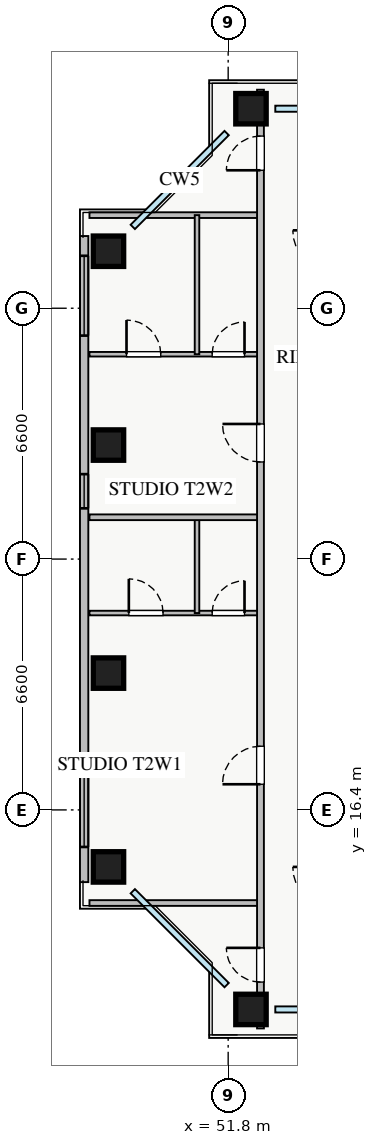
"""IFC4 building model, lengths in metres.
Left out: names, types, materials, properties, quantities, classifications, styles, units other than length and angle.
Written with IfcOpenShell. Run it as: python <this file> out.ifc"""

import sys

from ifc_helpers import new_model, si_unit, direction, frame, frame_2d, origin, origin_2d, place, context, subcontext, project, spatial, rectangle, extrude, source, transform, mapped, element, fill, save


model = new_model("IFC4")
c1 = context("Model", 3, precision=1e-05, world=origin(), true_north=direction((0.0, 1.0)))
c2 = subcontext(c1, "Body", "Model", "MODEL_VIEW")
j1 = project(units=[si_unit("LENGTHUNIT", "METRE"), si_unit("PLANEANGLEUNIT", "RADIAN")], contexts=[c1])
p1 = place(None, origin())
s1 = spatial("IfcSite", under=j1, at=p1, CompositionType="ELEMENT")
p2 = place(p1, origin())
s2 = spatial("IfcBuilding", under=s1, at=p2, CompositionType="ELEMENT")
p3 = place(p2, frame((0.0, 0.0, 100.25)))
s3 = spatial("IfcBuildingStorey", under=s2, at=p3, CompositionType="ELEMENT", Elevation=100.25)
m1 = source(origin(), c2, "Body", "SweptSolid", [
    extrude(rectangle(XDim=0.8, YDim=0.8, at=origin_2d()), origin(), (0.0, 0.0, 1.0), 3.25),
])
for number, where, z_axis, x_axis in (
    (1, (52.4, 11.15, 0.0), (0.0, 0.0, 1.0), (1.0, 0.0, 0.0)),
    (2, (52.4, 34.85, 0.0), (0.0, 0.0, 1.0), (1.0, 0.0, 0.0)),
    (3, (48.65, 14.9, 0.0), (0.0, 0.0, 1.0), (1.0, 0.0, 0.0)),
    (4, (48.65, 20.0, 0.0), (0.0, 0.0, 1.0), (1.0, 0.0, 0.0)),
    (5, (48.65, 26.0, 0.0), (0.0, 0.0, 1.0), (1.0, 0.0, 0.0)),
    (6, (48.65, 31.1, 0.0), (0.0, 0.0, 1.0), (1.0, 0.0, 0.0)),
):
    element("IfcColumn", number, at=place(p3, frame(where, z_axis=z_axis, x_axis=x_axis)), inside=s3, PredefinedType="COLUMN", context=c2, shape_type="MappedRepresentation", body=[
        mapped(m1, transform((0.0, 0.0, 0.0), x_axis=(1.0, 0.0, 0.0), y_axis=(0.0, 1.0, 0.0), z_axis=(0.0, 0.0, 1.0), scale=1.0)),
    ])
p4 = place(p3, frame((48.01, 14.5, 0.0), z_axis=(0.0, 0.0, 1.0), x_axis=(0.0, 1.0, 0.0)))
e7 = element("IfcWall", 7, at=p4, inside=s3, PredefinedType="STANDARD", context=c2, shape_type="SweptSolid", body=[
    extrude(rectangle(XDim=17.0, YDim=0.22, at=frame_2d((8.5, 0.0))), origin(), (0.0, 0.0, 1.0), 2.61),
])
p5 = place(p4, frame((0.925, 0.0, 0.9)))
e8 = element("IfcOpeningElement", 8, at=p5, cuts=e7, PredefinedType="OPENING", context=c2, shape_type="SweptSolid", body=[
    extrude(rectangle(XDim=2.4, YDim=1.48, at=frame_2d((1.2, 0.74))), frame((0.0, 0.12, 0.0), z_axis=(0.0, -1.0, 0.0), x_axis=(1.0, 0.0, 0.0)), (0.0, 0.0, 1.0), 0.24),
])
p6 = place(p4, frame((14.38, 0.0, 0.9)))
e9 = element("IfcOpeningElement", 9, at=p6, cuts=e7, PredefinedType="OPENING", context=c2, shape_type="SweptSolid", body=[
    extrude(rectangle(XDim=2.1, YDim=1.5, at=frame_2d((1.05, 0.75))), frame((0.0, 0.12, 0.0), z_axis=(0.0, -1.0, 0.0), x_axis=(1.0, 0.0, 0.0)), (0.0, 0.0, 1.0), 0.24),
])
p7 = place(p4, frame((9.835, 0.0, 0.9)))
e10 = element("IfcOpeningElement", 10, at=p7, cuts=e7, PredefinedType="OPENING", context=c2, shape_type="SweptSolid", body=[
    extrude(rectangle(XDim=0.9, YDim=1.2, at=frame_2d((0.45, 0.6))), frame((0.0, 0.12, 0.0), z_axis=(0.0, -1.0, 0.0), x_axis=(1.0, 0.0, 0.0)), (0.0, 0.0, 1.0), 0.24),
])
for number, where, z_axis, x_axis in (
    (11, (48.15, 32.05, 0.0), (0.0, 0.0, 1.0), (1.0, 0.0, 0.0)),
    (12, (48.15, 13.95, 0.0), (0.0, 0.0, 1.0), (1.0, 0.0, 0.0)),
):
    element("IfcWall", number, at=place(p3, frame(where, z_axis=z_axis, x_axis=x_axis)), inside=s3, PredefinedType="PARTITIONING", context=c2, shape_type="SweptSolid", body=[
        extrude(rectangle(XDim=4.5, YDim=0.15, at=frame_2d((2.25, 0.0))), origin(), (0.0, 0.0, 1.0), 3.07),
    ])
p8 = place(p3, frame((48.15, 21.58, 0.0), z_axis=(0.0, 0.0, 1.0), x_axis=(1.0, 0.0, 0.0)))
e13 = element("IfcWall", 13, at=p8, inside=s3, PredefinedType="PLUMBINGWALL", context=c2, shape_type="SweptSolid", body=[
    extrude(rectangle(XDim=4.5, YDim=0.12, at=frame_2d((2.25, 0.0))), origin(), (0.0, 0.0, 1.0), 3.07),
])
p9 = place(p8, frame((1.036, 0.0, 0.0)))
e14 = element("IfcOpeningElement", 14, at=p9, cuts=e13, PredefinedType="OPENING", context=c2, shape_type="SweptSolid", body=[
    extrude(rectangle(XDim=0.9, YDim=2.05, at=frame_2d((0.45, 1.025))), frame((0.0, 0.07, 0.0), z_axis=(0.0, -1.0, 0.0), x_axis=(1.0, 0.0, 0.0)), (0.0, 0.0, 1.0), 0.14),
])
p10 = place(p8, frame((3.23, 0.0, 0.0)))
e15 = element("IfcOpeningElement", 15, at=p10, cuts=e13, PredefinedType="OPENING", context=c2, shape_type="SweptSolid", body=[
    extrude(rectangle(XDim=0.85, YDim=2.05, at=frame_2d((0.425, 1.025))), frame((0.0, 0.07, 0.0), z_axis=(0.0, -1.0, 0.0), x_axis=(1.0, 0.0, 0.0)), (0.0, 0.0, 1.0), 0.14),
])
p11 = place(p3, frame((50.98, 21.58, 0.0), z_axis=(0.0, 0.0, 1.0), x_axis=(0.0, 1.0, 0.0)))
e16 = element("IfcWall", 16, at=p11, inside=s3, PredefinedType="PLUMBINGWALL", context=c2, shape_type="SweptSolid", body=[
    extrude(rectangle(XDim=2.52, YDim=0.12, at=frame_2d((1.26, 0.0))), origin(), (0.0, 0.0, 1.0), 3.07),
])
p12 = place(p3, frame((48.15, 28.39, 0.0), z_axis=(0.0, 0.0, 1.0), x_axis=(1.0, 0.0, 0.0)))
e17 = element("IfcWall", 17, at=p12, inside=s3, PredefinedType="PLUMBINGWALL", context=c2, shape_type="SweptSolid", body=[
    extrude(rectangle(XDim=4.5, YDim=0.12, at=frame_2d((2.25, 0.0))), origin(), (0.0, 0.0, 1.0), 3.07),
])
p13 = place(p12, frame((0.975, 0.0, 0.0)))
e18 = element("IfcOpeningElement", 18, at=p13, cuts=e17, PredefinedType="OPENING", context=c2, shape_type="SweptSolid", body=[
    extrude(rectangle(XDim=0.9, YDim=2.05, at=frame_2d((0.45, 1.025))), frame((0.0, 0.07, 0.0), z_axis=(0.0, -1.0, 0.0), x_axis=(1.0, 0.0, 0.0)), (0.0, 0.0, 1.0), 0.14),
])
p14 = place(p12, frame((3.23, 0.0, 0.0)))
e19 = element("IfcOpeningElement", 19, at=p14, cuts=e17, PredefinedType="OPENING", context=c2, shape_type="SweptSolid", body=[
    extrude(rectangle(XDim=0.85, YDim=2.05, at=frame_2d((0.425, 1.025))), frame((0.0, 0.07, 0.0), z_axis=(0.0, -1.0, 0.0), x_axis=(1.0, 0.0, 0.0)), (0.0, 0.0, 1.0), 0.14),
])
p15 = place(p3, frame((50.98, 28.39, 0.0), z_axis=(0.0, 0.0, 1.0), x_axis=(0.0, 1.0, 0.0)))
e20 = element("IfcWall", 20, at=p15, inside=s3, PredefinedType="PLUMBINGWALL", context=c2, shape_type="SweptSolid", body=[
    extrude(rectangle(XDim=3.66, YDim=0.12, at=frame_2d((1.83, 0.0))), origin(), (0.0, 0.0, 1.0), 3.07),
])
p16 = place(p3, frame((48.15, 24.1, 0.0), z_axis=(0.0, 0.0, 1.0), x_axis=(1.0, 0.0, 0.0)))
e21 = element("IfcWall", 21, at=p16, inside=s3, PredefinedType="PARTITIONING", context=c2, shape_type="SweptSolid", body=[
    extrude(rectangle(XDim=4.5, YDim=0.15, at=frame_2d((2.25, 0.0))), origin(), (0.0, 0.0, 1.0), 3.07),
])
p17 = place(p3, frame((52.65, 10.65, 0.0), z_axis=(0.0, 0.0, 1.0), x_axis=(0.0, 1.0, 0.0)))
e22 = element("IfcWall", 22, at=p17, inside=s3, PredefinedType="PARTITIONING", context=c2, shape_type="SweptSolid", body=[
    extrude(rectangle(XDim=24.7, YDim=0.18, at=frame_2d((12.35, 0.0))), origin(), (0.0, 0.0, 1.0), 2.615),
])
p18 = place(p17, frame((22.58, 0.0, 0.0)))
e23 = element("IfcOpeningElement", 23, at=p18, cuts=e22, PredefinedType="OPENING", context=c2, shape_type="SweptSolid", body=[
    extrude(rectangle(XDim=0.9, YDim=2.05, at=frame_2d((0.45, 1.025))), frame((0.0, 0.1, 0.0), z_axis=(0.0, -1.0, 0.0), x_axis=(1.0, 0.0, 0.0)), (0.0, 0.0, 1.0), 0.2),
])
p19 = place(p17, frame((1.22, 0.0, 0.0)))
e24 = element("IfcOpeningElement", 24, at=p19, cuts=e22, PredefinedType="OPENING", context=c2, shape_type="SweptSolid", body=[
    extrude(rectangle(XDim=0.9, YDim=2.05, at=frame_2d((0.45, 1.025))), frame((0.0, 0.1, 0.0), z_axis=(0.0, -1.0, 0.0), x_axis=(1.0, 0.0, 0.0)), (0.0, 0.0, 1.0), 0.2),
])
p20 = place(p17, frame((6.425, 0.0, 0.0)))
e25 = element("IfcOpeningElement", 25, at=p20, cuts=e22, PredefinedType="OPENING", context=c2, shape_type="SweptSolid", body=[
    extrude(rectangle(XDim=1.0, YDim=2.05, at=frame_2d((0.5, 1.025))), frame((0.0, 0.1, 0.0), z_axis=(0.0, -1.0, 0.0), x_axis=(1.0, 0.0, 0.0)), (0.0, 0.0, 1.0), 0.2),
])
p21 = place(p17, frame((14.905, 0.0, 0.0)))
e26 = element("IfcOpeningElement", 26, at=p21, cuts=e22, PredefinedType="OPENING", context=c2, shape_type="SweptSolid", body=[
    extrude(rectangle(XDim=1.0, YDim=2.05, at=frame_2d((0.5, 1.025))), frame((0.0, 0.1, 0.0), z_axis=(0.0, -1.0, 0.0), x_axis=(1.0, 0.0, 0.0)), (0.0, 0.0, 1.0), 0.2),
])
m2 = source(origin(), c2, "Body", "SweptSolid", [
    extrude(rectangle(XDim=2.4, YDim=1.48, at=frame_2d((1.2, 0.74))), frame((0.0, 0.03, 0.0), z_axis=(0.0, -1.0, 0.0), x_axis=(1.0, 0.0, 0.0)), (0.0, 0.0, 1.0), 0.06),
])
p22 = place(p5, origin())
e27 = element("IfcWindow", 27, at=p22, inside=s3, PartitioningType="TRIPLE_PANEL_VERTICAL", PredefinedType="WINDOW", context=c2, shape_type="MappedRepresentation", body=[
    mapped(m2, transform((0.0, 0.0, 0.0), x_axis=(1.0, 0.0, 0.0), y_axis=(0.0, 1.0, 0.0), z_axis=(0.0, 0.0, 1.0), scale=1.0)),
])
fill(e8, e27)
m3 = source(origin(), c2, "Body", "SweptSolid", [
    extrude(rectangle(XDim=2.1, YDim=1.5, at=frame_2d((1.05, 0.75))), frame((0.0, 0.03, 0.0), z_axis=(0.0, -1.0, 0.0), x_axis=(1.0, 0.0, 0.0)), (0.0, 0.0, 1.0), 0.06),
])
p23 = place(p6, origin())
e28 = element("IfcWindow", 28, at=p23, inside=s3, PartitioningType="TRIPLE_PANEL_VERTICAL", PredefinedType="WINDOW", context=c2, shape_type="MappedRepresentation", body=[
    mapped(m3, transform((0.0, 0.0, 0.0), x_axis=(1.0, 0.0, 0.0), y_axis=(0.0, 1.0, 0.0), z_axis=(0.0, 0.0, 1.0), scale=1.0)),
])
fill(e9, e28)
m4 = source(origin(), c2, "Body", "SweptSolid", [
    extrude(rectangle(XDim=0.9, YDim=2.05, at=frame_2d((0.45, 1.025))), frame((0.0, 0.025, 0.0), z_axis=(0.0, -1.0, 0.0), x_axis=(1.0, 0.0, 0.0)), (0.0, 0.0, 1.0), 0.05),
])
p24 = place(p9, origin())
e29 = element("IfcDoor", 29, at=p24, inside=s3, OperationType="SINGLE_SWING_LEFT", PredefinedType="DOOR", context=c2, shape_type="MappedRepresentation", body=[
    mapped(m4, transform((0.0, 0.0, 0.0), x_axis=(1.0, 0.0, 0.0), y_axis=(0.0, 1.0, 0.0), z_axis=(0.0, 0.0, 1.0), scale=1.0)),
])
fill(e14, e29)
m5 = source(origin(), c2, "Body", "SweptSolid", [
    extrude(rectangle(XDim=0.85, YDim=2.05, at=frame_2d((0.425, 1.025))), frame((0.0, 0.025, 0.0), z_axis=(0.0, -1.0, 0.0), x_axis=(1.0, 0.0, 0.0)), (0.0, 0.0, 1.0), 0.05),
])
p25 = place(p10, origin())
e30 = element("IfcDoor", 30, at=p25, inside=s3, OperationType="SINGLE_SWING_RIGHT", PredefinedType="DOOR", context=c2, shape_type="MappedRepresentation", body=[
    mapped(m5, transform((0.0, 0.0, 0.0), x_axis=(1.0, 0.0, 0.0), y_axis=(0.0, 1.0, 0.0), z_axis=(0.0, 0.0, 1.0), scale=1.0)),
])
fill(e15, e30)
p26 = place(p13, origin())
e31 = element("IfcDoor", 31, at=p26, inside=s3, OperationType="SINGLE_SWING_LEFT", PredefinedType="DOOR", context=c2, shape_type="MappedRepresentation", body=[
    mapped(m4, transform((0.0, 0.0, 0.0), x_axis=(1.0, 0.0, 0.0), y_axis=(0.0, 1.0, 0.0), z_axis=(0.0, 0.0, 1.0), scale=1.0)),
])
fill(e18, e31)
p27 = place(p14, origin())
e32 = element("IfcDoor", 32, at=p27, inside=s3, OperationType="SINGLE_SWING_RIGHT", PredefinedType="DOOR", context=c2, shape_type="MappedRepresentation", body=[
    mapped(m5, transform((0.0, 0.0, 0.0), x_axis=(1.0, 0.0, 0.0), y_axis=(0.0, 1.0, 0.0), z_axis=(0.0, 0.0, 1.0), scale=1.0)),
])
fill(e19, e32)
p28 = place(p18, origin())
e33 = element("IfcDoor", 33, at=p28, inside=s3, OperationType="SINGLE_SWING_LEFT", PredefinedType="DOOR", context=c2, shape_type="MappedRepresentation", body=[
    mapped(m4, transform((0.0, 0.0, 0.0), x_axis=(1.0, 0.0, 0.0), y_axis=(0.0, 1.0, 0.0), z_axis=(0.0, 0.0, 1.0), scale=1.0)),
])
fill(e23, e33)
p29 = place(p19, origin())
e34 = element("IfcDoor", 34, at=p29, inside=s3, OperationType="SINGLE_SWING_RIGHT", PredefinedType="DOOR", context=c2, shape_type="MappedRepresentation", body=[
    mapped(m4, transform((0.0, 0.0, 0.0), x_axis=(1.0, 0.0, 0.0), y_axis=(0.0, 1.0, 0.0), z_axis=(0.0, 0.0, 1.0), scale=1.0)),
])
fill(e24, e34)
m6 = source(origin(), c2, "Body", "SweptSolid", [
    extrude(rectangle(XDim=1.0, YDim=2.05, at=frame_2d((0.5, 1.025))), frame((0.0, 0.025, 0.0), z_axis=(0.0, -1.0, 0.0), x_axis=(1.0, 0.0, 0.0)), (0.0, 0.0, 1.0), 0.05),
])
p30 = place(p20, origin())
e35 = element("IfcDoor", 35, at=p30, inside=s3, OperationType="SINGLE_SWING_LEFT", PredefinedType="DOOR", context=c2, shape_type="MappedRepresentation", body=[
    mapped(m6, transform((0.0, 0.0, 0.0), x_axis=(1.0, 0.0, 0.0), y_axis=(0.0, 1.0, 0.0), z_axis=(0.0, 0.0, 1.0), scale=1.0)),
])
fill(e25, e35)
p31 = place(p21, origin())
e36 = element("IfcDoor", 36, at=p31, inside=s3, OperationType="SINGLE_SWING_RIGHT", PredefinedType="DOOR", context=c2, shape_type="MappedRepresentation", body=[
    mapped(m6, transform((0.0, 0.0, 0.0), x_axis=(1.0, 0.0, 0.0), y_axis=(0.0, 1.0, 0.0), z_axis=(0.0, 0.0, 1.0), scale=1.0)),
])
fill(e26, e36)
m7 = source(origin(), c2, "Body", "SweptSolid", [
    extrude(rectangle(XDim=0.9, YDim=1.2, at=frame_2d((0.45, 0.6))), frame((0.0, 0.03, 0.0), z_axis=(0.0, -1.0, 0.0), x_axis=(1.0, 0.0, 0.0)), (0.0, 0.0, 1.0), 0.06),
])
p32 = place(p7, origin())
e37 = element("IfcWindow", 37, at=p32, inside=s3, PartitioningType="SINGLE_PANEL", PredefinedType="WINDOW", context=c2, shape_type="MappedRepresentation", body=[
    mapped(m7, transform((0.0, 0.0, 0.0), x_axis=(1.0, 0.0, 0.0), y_axis=(0.0, 1.0, 0.0), z_axis=(0.0, 0.0, 1.0), scale=1.0)),
])
fill(e10, e37)
save(model, sys.argv[1])
